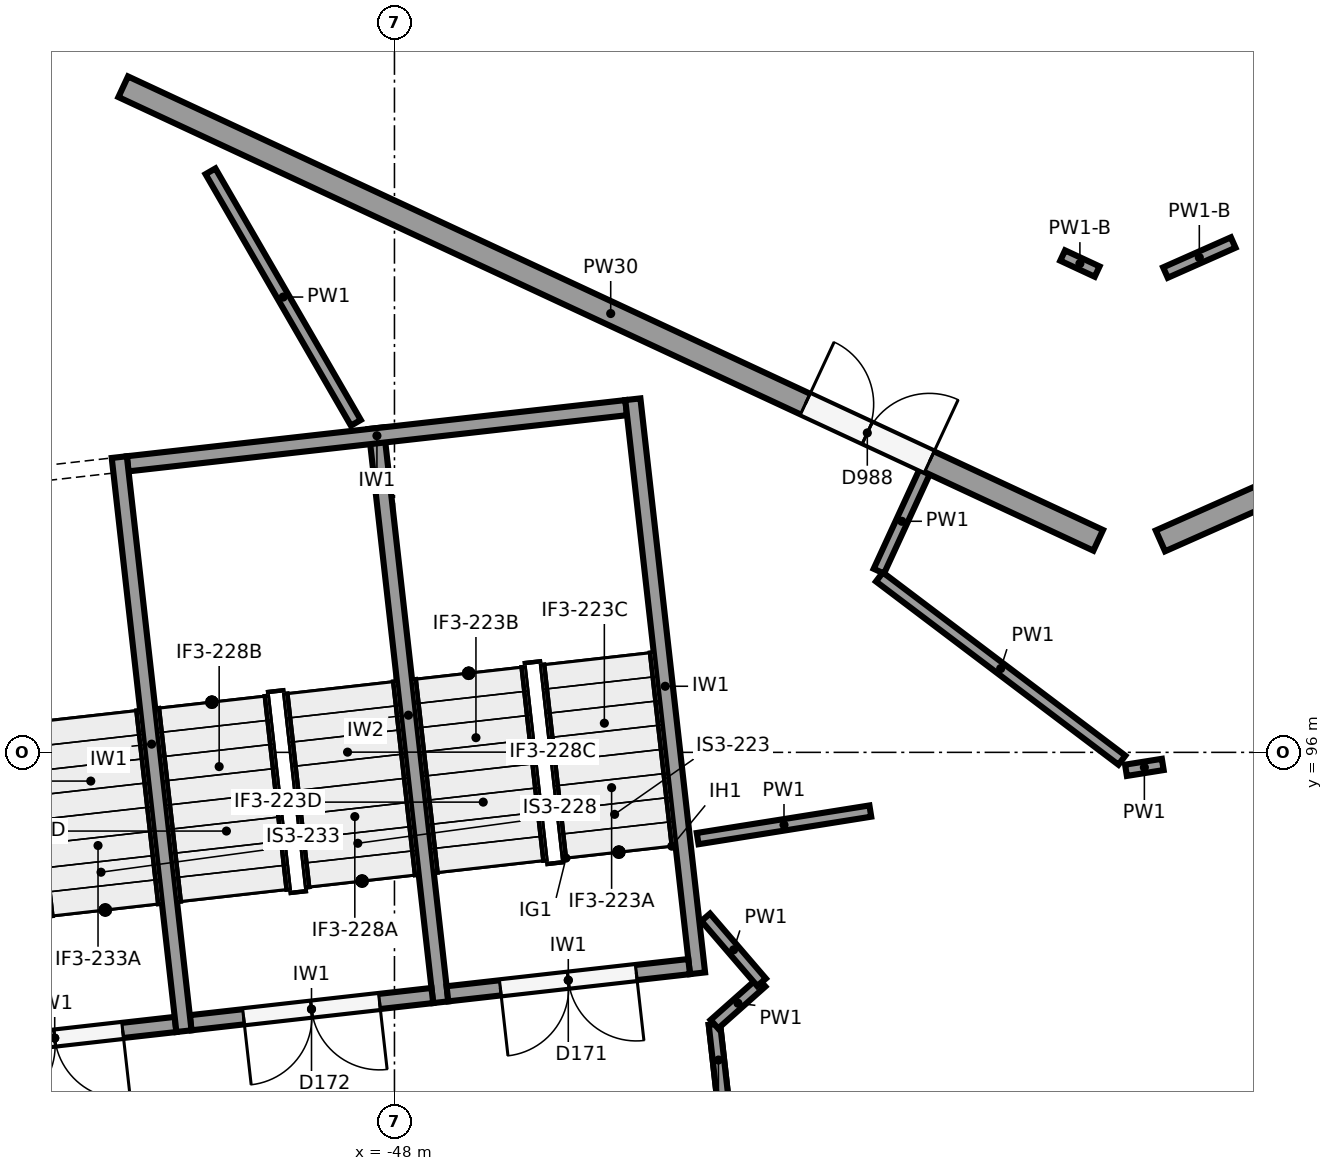
"""IFC4 building model, lengths in metres.
Left out: names, types, materials, properties, quantities, classifications, styles, units other than length and angle.
Written with IfcOpenShell. Run it as: python <this file> out.ifc"""

import sys

from ifc_helpers import new_model, si_unit, direction, frame, frame_2d, origin, origin_2d, place, context, subcontext, project, spatial, rectangle, circle, extrude, element, fill, save


model = new_model("IFC4")
c1 = context("Model", 3, precision=1e-05, world=origin(), true_north=direction((0.0, 1.0)))
c2 = subcontext(c1, "Body", "Model", "MODEL_VIEW")
j1 = project(units=[si_unit("LENGTHUNIT", "METRE"), si_unit("PLANEANGLEUNIT", "RADIAN")], contexts=[c1])
p1 = place(None, origin())
s1 = spatial("IfcSite", under=j1, at=p1, CompositionType="ELEMENT")
p2 = place(p1, origin())
s2 = spatial("IfcBuilding", under=s1, at=p2, CompositionType="ELEMENT")
p3 = place(p2, frame((0.0, 0.0, 6.5)))
s3 = spatial("IfcBuildingStorey", under=s2, at=p3, CompositionType="ELEMENT", Elevation=6.5)
p4 = place(p3, frame((-38.333, 98.6, 0.0), z_axis=(0.0, 0.0, 1.0), x_axis=(1.0, 0.0, 0.0)))
e1 = element("IfcColumn", 1, at=p4, inside=s3, PredefinedType="COLUMN", context=c2, shape_type="SweptSolid", body=[
    extrude(circle(Radius=0.45, at=origin_2d()), origin(), (0.0, 0.0, 1.0), 5.5),
])
p5 = place(p3, frame((-44.683, 91.091, 0.0), z_axis=(0.0, 0.0, 1.0), x_axis=(1.0, 0.0, 0.0)))
e2 = element("IfcColumn", 2, at=p5, inside=s3, PredefinedType="COLUMN", context=c2, shape_type="SweptSolid", body=[
    extrude(circle(Radius=0.55, at=origin_2d()), origin(), (0.0, 0.0, 1.0), 5.5),
])
p6 = place(p3, frame((-52.203, 105.052, 0.0), z_axis=(0.0, 0.0, 1.0), x_axis=(1.0, 0.0, 0.0)))
e3 = element("IfcColumn", 3, at=p6, inside=s3, PredefinedType="COLUMN", context=c2, shape_type="SweptSolid", body=[
    extrude(circle(Radius=0.7, at=origin_2d()), origin(), (0.0, 0.0, 1.0), 5.5),
])
p7 = place(p3, frame((-38.333, 102.6, 0.0), z_axis=(0.0, 0.0, 1.0), x_axis=(1.0, 0.0, 0.0)))
e4 = element("IfcColumn", 4, at=p7, inside=s3, PredefinedType="COLUMN", context=c2, shape_type="SweptSolid", body=[
    extrude(circle(Radius=0.4, at=origin_2d()), origin(), (0.0, 0.0, 1.0), 5.5),
])
p8 = place(p3, frame((-37.922, 98.782, 0.0), z_axis=(0.0, 0.0, 1.0), x_axis=(0.914138897099, 0.405401130748, 0.0)))
e5 = element("IfcWall", 5, at=p8, inside=s3, PredefinedType="SOLIDWALL", context=c2, shape_type="SweptSolid", body=[
    extrude(rectangle(XDim=15.824, YDim=0.3, at=frame_2d((7.912, 0.0))), origin(), (0.0, 0.0, 1.0), 3.85),
])
p9 = place(p3, frame((-51.569, 104.757, 0.0), z_axis=(0.0, 0.0, 1.0), x_axis=(0.906698705786, -0.421778919491, 0.0)))
e6 = element("IfcWall", 6, at=p9, inside=s3, PredefinedType="SOLIDWALL", context=c2, shape_type="SweptSolid", body=[
    extrude(rectangle(XDim=14.148, YDim=0.3, at=frame_2d((7.074, 0.0))), origin(), (0.0, 0.0, 1.0), 3.85),
])
p10 = place(p9, frame((9.897, 0.0, 0.0)))
e7 = element("IfcOpeningElement", 7, at=p10, cuts=e6, PredefinedType="OPENING", context=c2, shape_type="SweptSolid", body=[
    extrude(rectangle(XDim=1.8, YDim=2.4, at=frame_2d((0.9, 1.2))), frame((0.0, 0.16, 0.0), z_axis=(0.0, -1.0, 0.0), x_axis=(1.0, 0.0, 0.0)), (0.0, 0.0, 1.0), 0.32),
])
p11 = place(p3, frame((-44.863, 100.646, 0.0), z_axis=(0.0, 0.0, 1.0), x_axis=(0.111951003472, -0.993713727802, 0.0)))
e8 = element("IfcWall", 8, at=p11, inside=s3, PredefinedType="SHEAR", context=c2, shape_type="SweptSolid", body=[
    extrude(rectangle(XDim=7.6, YDim=0.2, at=frame_2d((3.8, 0.0))), origin(), (0.0, 0.0, 1.0), 5.15),
])
p12 = place(p3, frame((-51.621, 99.885, 0.0), z_axis=(0.0, 0.0, 1.0), x_axis=(0.111947429915, -0.993714130389, 0.0)))
e9 = element("IfcWall", 9, at=p12, inside=s3, PredefinedType="SHEAR", context=c2, shape_type="SweptSolid", body=[
    extrude(rectangle(XDim=7.6, YDim=0.2, at=frame_2d((3.8, 0.0))), origin(), (0.0, 0.0, 1.0), 5.15),
])
for number, where, z_axis, x_axis in (
    (10, (-44.951, 100.535, 0.0), (0.0, 0.0, 1.0), (-0.994, -0.112, 0.0)),
    (11, (-51.709, 99.774, 0.0), (0.0, 0.0, 1.0), (-0.994, -0.112, 0.0)),
):
    element("IfcWall", number, at=place(p3, frame(where, z_axis=z_axis, x_axis=x_axis)), inside=s3, PredefinedType="SHEAR", context=c2, shape_type="SweptSolid", body=[
        extrude(rectangle(XDim=6.6, YDim=0.2, at=frame_2d((3.3, 0.0))), origin(), (0.0, 0.0, 1.0), 5.15),
    ])
p13 = place(p3, frame((-48.242, 100.265, 0.0), z_axis=(0.0, 0.0, 1.0), x_axis=(0.111954577255, -0.993713325176, 0.0)))
e12 = element("IfcWall", 12, at=p13, inside=s3, PredefinedType="SHEAR", context=c2, shape_type="SweptSolid", body=[
    extrude(rectangle(XDim=7.6, YDim=0.2, at=frame_2d((3.8, 0.0))), origin(), (0.0, 0.0, 1.0), 5.15),
])
p14 = place(p3, frame((-44.123, 93.182, 0.0), z_axis=(0.0, 0.0, 1.0), x_axis=(-0.993717005286, -0.11192190762, 0.0)))
e13 = element("IfcWall", 13, at=p14, inside=s3, PredefinedType="SHEAR", context=c2, shape_type="SweptSolid", body=[
    extrude(rectangle(XDim=3.2, YDim=0.2, at=frame_2d((1.6, 0.0))), origin(), (0.0, 0.0, 1.0), 5.15),
])
p15 = place(p14, frame((0.7, 0.0, 0.0)))
e14 = element("IfcOpeningElement", 14, at=p15, cuts=e13, PredefinedType="OPENING", context=c2, shape_type="SweptSolid", body=[
    extrude(rectangle(XDim=1.8, YDim=2.1, at=frame_2d((0.9, 1.05))), frame((0.0, 0.11, 0.0), z_axis=(0.0, -1.0, 0.0), x_axis=(1.0, 0.0, 0.0)), (0.0, 0.0, 1.0), 0.22),
])
p16 = place(p3, frame((-47.502, 92.801, 0.0), z_axis=(0.0, 0.0, 1.0), x_axis=(-0.993707560215, -0.112005735442, 0.0)))
e15 = element("IfcWall", 15, at=p16, inside=s3, PredefinedType="SHEAR", context=c2, shape_type="SweptSolid", body=[
    extrude(rectangle(XDim=3.2, YDim=0.2, at=frame_2d((1.6, 0.0))), origin(), (0.0, 0.0, 1.0), 5.15),
])
p17 = place(p16, frame((0.7, 0.0, 0.0)))
e16 = element("IfcOpeningElement", 16, at=p17, cuts=e15, PredefinedType="OPENING", context=c2, shape_type="SweptSolid", body=[
    extrude(rectangle(XDim=1.8, YDim=2.1, at=frame_2d((0.9, 1.05))), frame((0.0, 0.11, 0.0), z_axis=(0.0, -1.0, 0.0), x_axis=(1.0, 0.0, 0.0)), (0.0, 0.0, 1.0), 0.22),
])
p18 = place(p3, frame((-50.88, 92.42, 0.0), z_axis=(0.0, 0.0, 1.0), x_axis=(-0.993707560215, -0.112005735442, 0.0)))
e17 = element("IfcWall", 17, at=p18, inside=s3, PredefinedType="SHEAR", context=c2, shape_type="SweptSolid", body=[
    extrude(rectangle(XDim=3.2, YDim=0.2, at=frame_2d((1.6, 0.0))), origin(), (0.0, 0.0, 1.0), 5.15),
])
p19 = place(p18, frame((0.7, 0.0, 0.0)))
e18 = element("IfcOpeningElement", 18, at=p19, cuts=e17, PredefinedType="OPENING", context=c2, shape_type="SweptSolid", body=[
    extrude(rectangle(XDim=1.8, YDim=2.1, at=frame_2d((0.9, 1.05))), frame((0.0, 0.11, 0.0), z_axis=(0.0, -1.0, 0.0), x_axis=(1.0, 0.0, 0.0)), (0.0, 0.0, 1.0), 0.22),
])
p20 = place(p3, frame((-48.508, 100.336, 0.0), z_axis=(0.0, 0.0, 1.0), x_axis=(-0.500439359674, 0.865771590715, 0.0)))
e19 = element("IfcWall", 19, at=p20, inside=s3, PredefinedType="PARTITIONING", context=c2, shape_type="SweptSolid", body=[
    extrude(rectangle(XDim=3.822, YDim=0.15, at=frame_2d((1.911, 0.0))), origin(), (0.0, 0.0, 1.0), 5.15),
])
p21 = place(p3, frame((-37.891, 95.841, 0.0), z_axis=(0.0, 0.0, 1.0), x_axis=(-0.987539881519, -0.157368937247, 0.0)))
e20 = element("IfcWall", 20, at=p21, inside=s3, PredefinedType="PARTITIONING", context=c2, shape_type="SweptSolid", body=[
    extrude(rectangle(XDim=0.49, YDim=0.15, at=frame_2d((0.245, 0.0))), origin(), (0.0, 0.0, 1.0), 5.15),
])
p22 = place(p3, frame((-36.965, 102.708, 0.0), z_axis=(0.0, 0.0, 1.0), x_axis=(-0.914193086295, -0.4052789175, 0.0)))
e21 = element("IfcWall", 21, at=p22, inside=s3, PredefinedType="PARTITIONING", context=c2, shape_type="SweptSolid", body=[
    extrude(rectangle(XDim=0.975, YDim=0.15, at=frame_2d((0.488, 0.0))), origin(), (0.0, 0.0, 1.0), 5.05),
])
p23 = place(p3, frame((-38.755, 102.325, 0.0), z_axis=(0.0, 0.0, 1.0), x_axis=(-0.906755828453, 0.421656101067, 0.0)))
e22 = element("IfcWall", 22, at=p23, inside=s3, PredefinedType="PARTITIONING", context=c2, shape_type="SweptSolid", body=[
    extrude(rectangle(XDim=0.5, YDim=0.15, at=frame_2d((0.25, 0.0))), origin(), (0.0, 0.0, 1.0), 5.05),
])
p24 = place(p3, frame((-38.429, 95.897, 0.0), z_axis=(0.0, 0.0, 1.0), x_axis=(-0.797833387107, 0.602878002931, 0.0)))
e23 = element("IfcWall", 23, at=p24, inside=s3, PredefinedType="PARTITIONING", context=c2, shape_type="SweptSolid", body=[
    extrude(rectangle(XDim=3.999, YDim=0.15, at=frame_2d((1.999, 0.0))), origin(), (0.0, 0.0, 1.0), 5.15),
])
p25 = place(p3, frame((-41.627, 98.384, 0.0), z_axis=(0.0, 0.0, 1.0), x_axis=(0.418061745586, 0.908418613238, 0.0)))
e24 = element("IfcWall", 24, at=p25, inside=s3, PredefinedType="PARTITIONING", context=c2, shape_type="SweptSolid", body=[
    extrude(rectangle(XDim=1.445, YDim=0.15, at=frame_2d((0.723, 0.0))), origin(), (0.0, 0.0, 1.0), 5.15),
])
p26 = place(p3, frame((-41.739, 95.228, 0.0), z_axis=(0.0, 0.0, 1.0), x_axis=(-0.987519978733, -0.157493782745, 0.0)))
e25 = element("IfcWall", 25, at=p26, inside=s3, PredefinedType="PARTITIONING", context=c2, shape_type="SweptSolid", body=[
    extrude(rectangle(XDim=2.301, YDim=0.15, at=frame_2d((1.15, 0.0))), origin(), (0.0, 0.0, 1.0), 5.15),
])
p27 = place(p3, frame((-43.154, 86.767, 0.0), z_axis=(0.0, 0.0, 1.0), x_axis=(-0.111890590311, 0.993720532041, 0.0)))
e26 = element("IfcWall", 26, at=p27, inside=s3, PredefinedType="PARTITIONING", context=c2, shape_type="SweptSolid", body=[
    extrude(rectangle(XDim=5.693, YDim=0.15, at=frame_2d((2.846, 0.0))), origin(), (0.0, 0.0, 1.0), 4.05),
])
p28 = place(p27, frame((2.05, 0.0, 0.0)))
e27 = element("IfcOpeningElement", 27, at=p28, cuts=e26, PredefinedType="OPENING", context=c2, shape_type="SweptSolid", body=[
    extrude(rectangle(XDim=1.8, YDim=2.1, at=frame_2d((0.9, 1.05))), frame((0.0, 0.085, 0.0), z_axis=(0.0, -1.0, 0.0), x_axis=(1.0, 0.0, 0.0)), (0.0, 0.0, 1.0), 0.17),
])
p29 = place(p3, frame((-43.685, 91.481, 4.05), z_axis=(0.0, 0.0, 1.0), x_axis=(-0.111674075876, 0.99374488717, 0.0)))
e28 = element("IfcWall", 28, at=p29, inside=s3, PredefinedType="PARTITIONING", context=c2, shape_type="SweptSolid", body=[
    extrude(rectangle(XDim=0.949, YDim=0.15, at=frame_2d((0.474, 0.0))), origin(), (0.0, 0.0, 1.0), 1.1),
])
p30 = place(p3, frame((-43.791, 92.424, 0.0), z_axis=(0.0, 0.0, 1.0), x_axis=(0.747490432018, 0.664272575109, 0.0)))
e29 = element("IfcWall", 29, at=p30, inside=s3, PredefinedType="PARTITIONING", context=c2, shape_type="SweptSolid", body=[
    extrude(rectangle(XDim=0.83, YDim=0.15, at=frame_2d((0.415, 0.0))), origin(), (0.0, 0.0, 1.0), 5.15),
])
p31 = place(p3, frame((-43.17, 92.975, 0.0), z_axis=(0.0, 0.0, 1.0), x_axis=(-0.651825129524, 0.75836930352, 0.0)))
e30 = element("IfcWall", 30, at=p31, inside=s3, PredefinedType="PARTITIONING", context=c2, shape_type="SweptSolid", body=[
    extrude(rectangle(XDim=1.127, YDim=0.15, at=frame_2d((0.564, 0.0))), origin(), (0.0, 0.0, 1.0), 5.15),
])
p32 = place(p10, origin())
e31 = element("IfcDoor", 31, at=p32, inside=s3, OperationType="DOUBLE_DOOR_SINGLE_SWING", PredefinedType="DOOR", context=c2, shape_type="SweptSolid", body=[
    extrude(rectangle(XDim=1.8, YDim=2.4, at=frame_2d((0.9, 1.2))), frame((0.0, 0.025, 0.0), z_axis=(0.0, -1.0, 0.0), x_axis=(1.0, 0.0, 0.0)), (0.0, 0.0, 1.0), 0.05),
])
fill(e7, e31)
p33 = place(p15, origin())
e32 = element("IfcDoor", 32, at=p33, inside=s3, OperationType="DOUBLE_DOOR_SINGLE_SWING", PredefinedType="DOOR", context=c2, shape_type="SweptSolid", body=[
    extrude(rectangle(XDim=1.8, YDim=2.1, at=frame_2d((0.9, 1.05))), frame((0.0, 0.025, 0.0), z_axis=(0.0, -1.0, 0.0), x_axis=(1.0, 0.0, 0.0)), (0.0, 0.0, 1.0), 0.05),
])
fill(e14, e32)
p34 = place(p17, origin())
e33 = element("IfcDoor", 33, at=p34, inside=s3, OperationType="DOUBLE_DOOR_SINGLE_SWING", PredefinedType="DOOR", context=c2, shape_type="SweptSolid", body=[
    extrude(rectangle(XDim=1.8, YDim=2.1, at=frame_2d((0.9, 1.05))), frame((0.0, 0.025, 0.0), z_axis=(0.0, -1.0, 0.0), x_axis=(1.0, 0.0, 0.0)), (0.0, 0.0, 1.0), 0.05),
])
fill(e16, e33)
p35 = place(p19, origin())
e34 = element("IfcDoor", 34, at=p35, inside=s3, OperationType="DOUBLE_DOOR_SINGLE_SWING", PredefinedType="DOOR", context=c2, shape_type="SweptSolid", body=[
    extrude(rectangle(XDim=1.8, YDim=2.1, at=frame_2d((0.9, 1.05))), frame((0.0, 0.025, 0.0), z_axis=(0.0, -1.0, 0.0), x_axis=(1.0, 0.0, 0.0)), (0.0, 0.0, 1.0), 0.05),
])
fill(e18, e34)
save(model, sys.argv[1])
